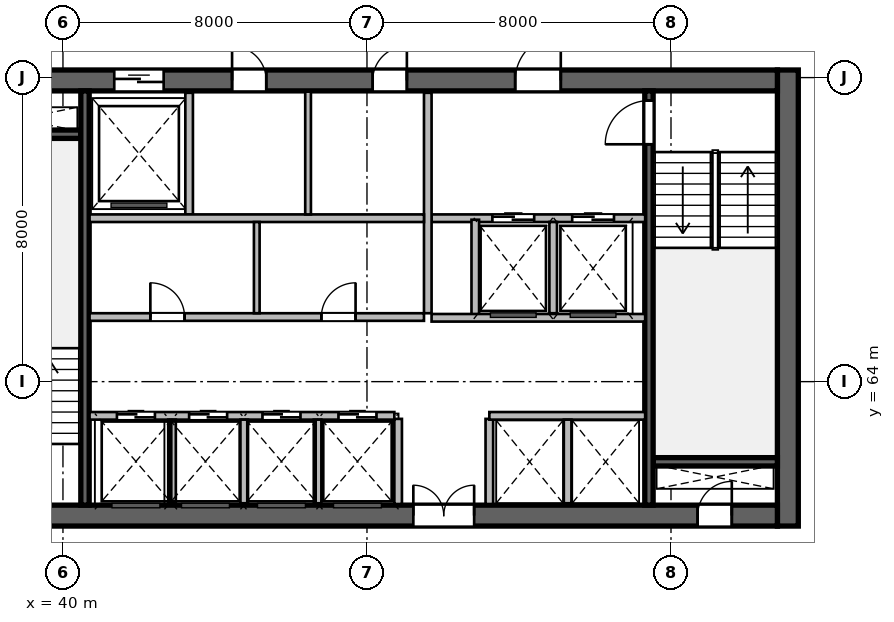
"""IFC4 building model, lengths in metres.
Left out: names, types, materials, properties, quantities, classifications, styles, units other than length and angle.
Written with IfcOpenShell. Run it as: python <this file> out.ifc"""

import sys

from ifc_helpers import new_model, si_unit, direction, frame, frame_2d, origin, place, context, subcontext, project, spatial, rectangle, extrude, source, transform, mapped, element, fill, save


model = new_model("IFC4")
c1 = context("Model", 3, precision=1e-05, world=origin(), true_north=direction((0.0, 1.0)))
c2 = subcontext(c1, "Body", "Model", "MODEL_VIEW")
j1 = project(units=[si_unit("LENGTHUNIT", "METRE"), si_unit("PLANEANGLEUNIT", "RADIAN")], contexts=[c1])
p1 = place(None, origin())
s1 = spatial("IfcSite", under=j1, at=p1, CompositionType="ELEMENT")
p2 = place(p1, origin())
s2 = spatial("IfcBuilding", under=s1, at=p2, CompositionType="ELEMENT")
p3 = place(p2, frame((0.0, 0.0, 75.0)))
s3 = spatial("IfcBuildingStorey", under=s2, at=p3, CompositionType="ELEMENT", Elevation=75.0)
m1 = source(origin(), c2, "Body", "SweptSolid", [
    extrude(rectangle(XDim=12.0, YDim=0.55, at=frame_2d((6.0, 0.0))), origin(), (0.0, 0.0, 1.0), 3.6),
])
p4 = place(p3, frame((59.075, 60.2, 0.0), z_axis=(0.0, 0.0, 1.0), x_axis=(0.0, 1.0, 0.0)))
e1 = element("IfcWall", 1, at=p4, inside=s3, PredefinedType="SHEAR", context=c2, shape_type="MappedRepresentation", body=[
    mapped(m1, transform((0.0, 0.0, 0.0), scale=1.0)),
])
m2 = source(origin(), c2, "Body", "SweptSolid", [
    extrude(rectangle(XDim=21.6, YDim=0.55, at=frame_2d((10.8, 0.0))), origin(), (0.0, 0.0, 1.0), 3.6),
])
p5 = place(p3, frame((37.2, 60.475, 0.0), z_axis=(0.0, 0.0, 1.0), x_axis=(1.0, 0.0, 0.0)))
e2 = element("IfcWall", 2, at=p5, inside=s3, PredefinedType="SHEAR", context=c2, shape_type="MappedRepresentation", body=[
    mapped(m2, transform((0.0, 0.0, 0.0), scale=1.0)),
])
p6 = place(p5, frame((1.1, 0.0, 0.0)))
e3 = element("IfcOpeningElement", 3, at=p6, cuts=e2, PredefinedType="OPENING", context=c2, shape_type="SweptSolid", body=[
    extrude(rectangle(XDim=1.15, YDim=2.15, at=frame_2d((0.575, 1.075))), frame((0.0, 0.285, 0.0), z_axis=(0.0, -1.0, 0.0), x_axis=(1.0, 0.0, 0.0)), (0.0, 0.0, 1.0), 0.57),
])
p7 = place(p5, frame((19.5, 0.0, 0.0)))
e4 = element("IfcOpeningElement", 4, at=p7, cuts=e2, PredefinedType="OPENING", context=c2, shape_type="SweptSolid", body=[
    extrude(rectangle(XDim=0.9, YDim=2.1, at=frame_2d((0.45, 1.05))), frame((0.0, 0.285, 0.0), z_axis=(0.0, -1.0, 0.0), x_axis=(1.0, 0.0, 0.0)), (0.0, 0.0, 1.0), 0.57),
])
p8 = place(p5, frame((12.02, 0.0, 0.0)))
e5 = element("IfcOpeningElement", 5, at=p8, cuts=e2, PredefinedType="OPENING", context=c2, shape_type="SweptSolid", body=[
    extrude(rectangle(XDim=1.6, YDim=2.15, at=frame_2d((0.8, 1.075))), frame((0.0, 0.285, 0.0), z_axis=(0.0, -1.0, 0.0), x_axis=(1.0, 0.0, 0.0)), (0.0, 0.0, 1.0), 0.57),
])
p9 = place(p3, frame((37.2, 71.925, 0.0), z_axis=(0.0, 0.0, 1.0), x_axis=(1.0, 0.0, 0.0)))
e6 = element("IfcWall", 6, at=p9, inside=s3, PredefinedType="SHEAR", context=c2, shape_type="MappedRepresentation", body=[
    mapped(m2, transform((0.0, 0.0, 0.0), scale=1.0)),
])
p10 = place(p9, frame((1.2, 0.0, 0.0)))
e7 = element("IfcOpeningElement", 7, at=p10, cuts=e6, PredefinedType="OPENING", context=c2, shape_type="SweptSolid", body=[
    extrude(rectangle(XDim=0.9, YDim=2.1, at=frame_2d((0.45, 1.05))), frame((0.0, 0.285, 0.0), z_axis=(0.0, -1.0, 0.0), x_axis=(1.0, 0.0, 0.0)), (0.0, 0.0, 1.0), 0.57),
])
p11 = place(p9, frame((14.7, 0.0, 0.0)))
e8 = element("IfcOpeningElement", 8, at=p11, cuts=e6, PredefinedType="OPENING", context=c2, shape_type="SweptSolid", body=[
    extrude(rectangle(XDim=1.2, YDim=2.15, at=frame_2d((0.6, 1.075))), frame((0.0, 0.285, 0.0), z_axis=(0.0, -1.0, 0.0), x_axis=(1.0, 0.0, 0.0)), (0.0, 0.0, 1.0), 0.57),
])
p12 = place(p9, frame((4.15, 0.0, 0.0)))
e9 = element("IfcOpeningElement", 9, at=p12, cuts=e6, PredefinedType="OPENING", context=c2, shape_type="SweptSolid", body=[
    extrude(rectangle(XDim=1.3, YDim=2.15, at=frame_2d((0.65, 1.075))), frame((0.0, 0.285, 0.0), z_axis=(0.0, -1.0, 0.0), x_axis=(1.0, 0.0, 0.0)), (0.0, 0.0, 1.0), 0.57),
])
p13 = place(p9, frame((7.25, 0.0, 0.0)))
e10 = element("IfcOpeningElement", 10, at=p13, cuts=e6, PredefinedType="OPENING", context=c2, shape_type="SweptSolid", body=[
    extrude(rectangle(XDim=0.9, YDim=2.1, at=frame_2d((0.45, 1.05))), frame((0.0, 0.285, 0.0), z_axis=(0.0, -1.0, 0.0), x_axis=(1.0, 0.0, 0.0)), (0.0, 0.0, 1.0), 0.57),
])
p14 = place(p9, frame((10.95, 0.0, 0.0)))
e11 = element("IfcOpeningElement", 11, at=p14, cuts=e6, PredefinedType="OPENING", context=c2, shape_type="SweptSolid", body=[
    extrude(rectangle(XDim=0.9, YDim=2.1, at=frame_2d((0.45, 1.05))), frame((0.0, 0.285, 0.0), z_axis=(0.0, -1.0, 0.0), x_axis=(1.0, 0.0, 0.0)), (0.0, 0.0, 1.0), 0.57),
])
m3 = source(origin(), c2, "Body", "SweptSolid", [
    extrude(rectangle(XDim=3.27, YDim=0.22, at=frame_2d((1.635, 0.0))), origin(), (0.0, 0.0, 1.0), 3.6),
])
for number, where, z_axis, x_axis in (
    (12, (37.2, 70.51, 0.0), (0.0, 0.0, 1.0), (1.0, 0.0, 0.0)),
    (13, (55.53, 61.89, 0.0), (0.0, 0.0, 1.0), (1.0, 0.0, 0.0)),
):
    element("IfcWall", number, at=place(p3, frame(where, z_axis=z_axis, x_axis=x_axis)), inside=s3, PredefinedType="SHEAR", context=c2, shape_type="MappedRepresentation", body=[
        mapped(m3, transform((0.0, 0.0, 0.0), scale=1.0)),
    ])
m4 = source(origin(), c2, "Body", "SweptSolid", [
    extrude(rectangle(XDim=10.9, YDim=0.22, at=frame_2d((5.45, 0.0))), origin(), (0.0, 0.0, 1.0), 3.6),
])
p15 = place(p3, frame((40.58, 60.75, 0.0), z_axis=(0.0, 0.0, 1.0), x_axis=(0.0, 1.0, 0.0)))
e14 = element("IfcWall", 14, at=p15, inside=s3, PredefinedType="SHEAR", context=c2, shape_type="MappedRepresentation", body=[
    mapped(m4, transform((0.0, 0.0, 0.0), scale=1.0)),
])
p16 = place(p3, frame((55.42, 60.75, 0.0), z_axis=(0.0, 0.0, 1.0), x_axis=(0.0, 1.0, 0.0)))
e15 = element("IfcWall", 15, at=p16, inside=s3, PredefinedType="SHEAR", context=c2, shape_type="MappedRepresentation", body=[
    mapped(m4, transform((0.0, 0.0, 0.0), scale=1.0)),
])
p17 = place(p16, frame((9.495, 0.0, 0.0)))
e16 = element("IfcOpeningElement", 16, at=p17, cuts=e15, PredefinedType="OPENING", context=c2, shape_type="SweptSolid", body=[
    extrude(rectangle(XDim=1.15, YDim=2.15, at=frame_2d((0.575, 1.075))), frame((0.0, 0.12, 0.0), z_axis=(0.0, -1.0, 0.0), x_axis=(1.0, 0.0, 0.0)), (0.0, 0.0, 1.0), 0.24),
])
m5 = source(origin(), c2, "Body", "SweptSolid", [
    extrude(rectangle(XDim=2.24, YDim=0.2, at=frame_2d((1.12, 0.0))), origin(), (0.0, 0.0, 1.0), 3.36),
])
for number, where, z_axis, x_axis in (
    (17, (48.82, 60.78, 0.0), (0.0, 0.0, 1.0), (0.0, 1.0, 0.0)),
    (18, (51.22, 60.78, 0.0), (0.0, 0.0, 1.0), (0.0, 1.0, 0.0)),
):
    element("IfcWall", number, at=place(p3, frame(where, z_axis=z_axis, x_axis=x_axis)), inside=s3, PredefinedType="SOLIDWALL", context=c2, shape_type="MappedRepresentation", body=[
        mapped(m5, transform((0.0, 0.0, 0.0), scale=1.0)),
    ])
m6 = source(origin(), c2, "Body", "SweptSolid", [
    extrude(rectangle(XDim=5.62, YDim=0.2, at=frame_2d((2.81, 0.0))), origin(), (0.0, 0.0, 1.0), 3.36),
])
p18 = place(p3, frame((49.7, 68.3, 0.0), z_axis=(0.0, 0.0, 1.0), x_axis=(1.0, 0.0, 0.0)))
e19 = element("IfcWall", 19, at=p18, inside=s3, PredefinedType="SOLIDWALL", context=c2, shape_type="MappedRepresentation", body=[
    mapped(m6, transform((0.0, 0.0, 0.0), scale=1.0)),
])
p19 = place(p18, frame((1.6, 0.0, 0.0)))
e20 = element("IfcOpeningElement", 20, at=p19, cuts=e19, PredefinedType="OPENING", context=c2, shape_type="SweptSolid", body=[
    extrude(rectangle(XDim=1.1, YDim=2.15, at=frame_2d((0.55, 1.075))), frame((0.0, 0.11, 0.0), z_axis=(0.0, -1.0, 0.0), x_axis=(1.0, 0.0, 0.0)), (0.0, 0.0, 1.0), 0.22),
])
p20 = place(p18, frame((3.7, 0.0, 0.0)))
e21 = element("IfcOpeningElement", 21, at=p20, cuts=e19, PredefinedType="OPENING", context=c2, shape_type="SweptSolid", body=[
    extrude(rectangle(XDim=1.1, YDim=2.15, at=frame_2d((0.55, 1.075))), frame((0.0, 0.11, 0.0), z_axis=(0.0, -1.0, 0.0), x_axis=(1.0, 0.0, 0.0)), (0.0, 0.0, 1.0), 0.22),
])
m7 = source(origin(), c2, "Body", "SweptSolid", [
    extrude(rectangle(XDim=5.8, YDim=0.2, at=frame_2d((2.9, 0.0))), origin(), (0.0, 0.0, 1.0), 3.36),
])
p21 = place(p3, frame((49.6, 65.8, 0.0), z_axis=(0.0, 0.0, 1.0), x_axis=(0.0, 1.0, 0.0)))
e22 = element("IfcWall", 22, at=p21, inside=s3, PredefinedType="SOLIDWALL", context=c2, shape_type="MappedRepresentation", body=[
    mapped(m7, transform((0.0, 0.0, 0.0), scale=1.0)),
])
m8 = source(origin(), c2, "Body", "SweptSolid", [
    extrude(rectangle(XDim=2.58, YDim=0.2, at=frame_2d((1.29, 0.0))), origin(), (0.0, 0.0, 1.0), 3.36),
])
p22 = place(p3, frame((50.85, 65.68, 0.0), z_axis=(0.0, 0.0, 1.0), x_axis=(0.0, 1.0, 0.0)))
e23 = element("IfcWall", 23, at=p22, inside=s3, PredefinedType="SOLIDWALL", context=c2, shape_type="MappedRepresentation", body=[
    mapped(m8, transform((0.0, 0.0, 0.0), scale=1.0)),
])
m9 = source(origin(), c2, "Body", "SweptSolid", [
    extrude(rectangle(XDim=2.4, YDim=0.2, at=frame_2d((1.2, 0.0))), origin(), (0.0, 0.0, 1.0), 3.36),
])
p23 = place(p3, frame((52.9, 65.8, 0.0), z_axis=(0.0, 0.0, 1.0), x_axis=(0.0, 1.0, 0.0)))
e24 = element("IfcWall", 24, at=p23, inside=s3, PredefinedType="SOLIDWALL", context=c2, shape_type="MappedRepresentation", body=[
    mapped(m9, transform((0.0, 0.0, 0.0), scale=1.0)),
])
p24 = place(p3, frame((49.7, 65.68, 0.0), z_axis=(0.0, 0.0, 1.0), x_axis=(1.0, 0.0, 0.0)))
e25 = element("IfcWall", 25, at=p24, inside=s3, PredefinedType="SOLIDWALL", context=c2, shape_type="MappedRepresentation", body=[
    mapped(m6, transform((0.0, 0.0, 0.0), scale=1.0)),
])
m10 = source(origin(), c2, "Body", "SweptSolid", [
    extrude(rectangle(XDim=3.2, YDim=0.2, at=frame_2d((1.6, 0.0))), origin(), (0.0, 0.0, 1.0), 3.36),
])
p25 = place(p3, frame((43.32, 68.4, 0.0), z_axis=(0.0, 0.0, 1.0), x_axis=(0.0, 1.0, 0.0)))
e26 = element("IfcWall", 26, at=p25, inside=s3, PredefinedType="SOLIDWALL", context=c2, shape_type="MappedRepresentation", body=[
    mapped(m10, transform((0.0, 0.0, 0.0), scale=1.0)),
])
m11 = source(origin(), c2, "Body", "SweptSolid", [
    extrude(rectangle(XDim=8.8, YDim=0.2, at=frame_2d((4.4, 0.0))), origin(), (0.0, 0.0, 1.0), 3.36),
])
p26 = place(p3, frame((40.7, 68.3, 0.0), z_axis=(0.0, 0.0, 1.0), x_axis=(1.0, 0.0, 0.0)))
e27 = element("IfcWall", 27, at=p26, inside=s3, PredefinedType="SOLIDWALL", context=c2, shape_type="MappedRepresentation", body=[
    mapped(m11, transform((0.0, 0.0, 0.0), scale=1.0)),
])
m12 = source(origin(), c2, "Body", "SweptSolid", [
    extrude(rectangle(XDim=3.23, YDim=0.15, at=frame_2d((1.615, 0.0))), origin(), (0.0, 0.0, 1.0), 3.36),
])
p27 = place(p3, frame((46.45, 68.4, 0.0), z_axis=(0.0, 0.0, 1.0), x_axis=(0.0, 1.0, 0.0)))
e28 = element("IfcWall", 28, at=p27, inside=s3, PredefinedType="PARTITIONING", context=c2, shape_type="MappedRepresentation", body=[
    mapped(m12, transform((0.0, 0.0, 0.0), scale=1.0)),
])
m13 = source(origin(), c2, "Body", "SweptSolid", [
    extrude(rectangle(XDim=8.02, YDim=0.2, at=frame_2d((4.01, 0.0))), origin(), (0.0, 0.0, 1.0), 3.36),
])
p28 = place(p3, frame((40.7, 63.1, 0.0), z_axis=(0.0, 0.0, 1.0), x_axis=(1.0, 0.0, 0.0)))
e29 = element("IfcWall", 29, at=p28, inside=s3, PredefinedType="SOLIDWALL", context=c2, shape_type="MappedRepresentation", body=[
    mapped(m13, transform((0.0, 0.0, 0.0), scale=1.0)),
])
p29 = place(p28, frame((0.72, 0.0, 0.0)))
e30 = element("IfcOpeningElement", 30, at=p29, cuts=e29, PredefinedType="OPENING", context=c2, shape_type="SweptSolid", body=[
    extrude(rectangle(XDim=1.0, YDim=2.15, at=frame_2d((0.5, 1.075))), frame((0.0, 0.11, 0.0), z_axis=(0.0, -1.0, 0.0), x_axis=(1.0, 0.0, 0.0)), (0.0, 0.0, 1.0), 0.22),
])
p30 = place(p28, frame((2.62, 0.0, 0.0)))
e31 = element("IfcOpeningElement", 31, at=p30, cuts=e29, PredefinedType="OPENING", context=c2, shape_type="SweptSolid", body=[
    extrude(rectangle(XDim=1.0, YDim=2.15, at=frame_2d((0.5, 1.075))), frame((0.0, 0.11, 0.0), z_axis=(0.0, -1.0, 0.0), x_axis=(1.0, 0.0, 0.0)), (0.0, 0.0, 1.0), 0.22),
])
p31 = place(p28, frame((4.55, 0.0, 0.0)))
e32 = element("IfcOpeningElement", 32, at=p31, cuts=e29, PredefinedType="OPENING", context=c2, shape_type="SweptSolid", body=[
    extrude(rectangle(XDim=1.0, YDim=2.15, at=frame_2d((0.5, 1.075))), frame((0.0, 0.11, 0.0), z_axis=(0.0, -1.0, 0.0), x_axis=(1.0, 0.0, 0.0)), (0.0, 0.0, 1.0), 0.22),
])
p32 = place(p28, frame((6.55, 0.0, 0.0)))
e33 = element("IfcOpeningElement", 33, at=p32, cuts=e29, PredefinedType="OPENING", context=c2, shape_type="SweptSolid", body=[
    extrude(rectangle(XDim=1.0, YDim=2.15, at=frame_2d((0.5, 1.075))), frame((0.0, 0.11, 0.0), z_axis=(0.0, -1.0, 0.0), x_axis=(1.0, 0.0, 0.0)), (0.0, 0.0, 1.0), 0.22),
])
m14 = source(origin(), c2, "Body", "SweptSolid", [
    extrude(rectangle(XDim=4.1, YDim=0.2, at=frame_2d((2.05, 0.0))), origin(), (0.0, 0.0, 1.0), 3.36),
])
p33 = place(p3, frame((51.22, 63.1, 0.0), z_axis=(0.0, 0.0, 1.0), x_axis=(1.0, 0.0, 0.0)))
e34 = element("IfcWall", 34, at=p33, inside=s3, PredefinedType="SOLIDWALL", context=c2, shape_type="MappedRepresentation", body=[
    mapped(m14, transform((0.0, 0.0, 0.0), scale=1.0)),
])
m15 = source(origin(), c2, "Body", "SweptSolid", [
    extrude(rectangle(XDim=2.2, YDim=0.2, at=frame_2d((1.1, 0.0))), origin(), (0.0, 0.0, 1.0), 3.36),
])
for number, where, z_axis, x_axis in (
    (35, (42.87, 60.8, 0.0), (0.0, 0.0, 1.0), (0.0, 1.0, 0.0)),
    (36, (44.77, 60.8, 0.0), (0.0, 0.0, 1.0), (0.0, 1.0, 0.0)),
    (37, (46.7, 60.8, 0.0), (0.0, 0.0, 1.0), (0.0, 1.0, 0.0)),
    (38, (53.28, 60.8, 0.0), (0.0, 0.0, 1.0), (0.0, 1.0, 0.0)),
):
    element("IfcWall", number, at=place(p3, frame(where, z_axis=z_axis, x_axis=x_axis)), inside=s3, PredefinedType="SOLIDWALL", context=c2, shape_type="MappedRepresentation", body=[
        mapped(m15, transform((0.0, 0.0, 0.0), scale=1.0)),
    ])
p34 = place(p3, frame((40.7, 65.7, 0.0), z_axis=(0.0, 0.0, 1.0), x_axis=(1.0, 0.0, 0.0)))
e39 = element("IfcWall", 39, at=p34, inside=s3, PredefinedType="SOLIDWALL", context=c2, shape_type="MappedRepresentation", body=[
    mapped(m11, transform((0.0, 0.0, 0.0), scale=1.0)),
])
p35 = place(p34, frame((1.6, 0.0, 0.0)))
e40 = element("IfcOpeningElement", 40, at=p35, cuts=e39, PredefinedType="OPENING", context=c2, shape_type="SweptSolid", body=[
    extrude(rectangle(XDim=0.9, YDim=2.1, at=frame_2d((0.45, 1.05))), frame((0.0, 0.11, 0.0), z_axis=(0.0, -1.0, 0.0), x_axis=(1.0, 0.0, 0.0)), (0.0, 0.0, 1.0), 0.22),
])
p36 = place(p34, frame((6.1, 0.0, 0.0)))
e41 = element("IfcOpeningElement", 41, at=p36, cuts=e39, PredefinedType="OPENING", context=c2, shape_type="SweptSolid", body=[
    extrude(rectangle(XDim=0.9, YDim=2.1, at=frame_2d((0.45, 1.05))), frame((0.0, 0.11, 0.0), z_axis=(0.0, -1.0, 0.0), x_axis=(1.0, 0.0, 0.0)), (0.0, 0.0, 1.0), 0.22),
])
m16 = source(origin(), c2, "Body", "SweptSolid", [
    extrude(rectangle(XDim=2.4, YDim=0.15, at=frame_2d((1.2, 0.0))), origin(), (0.0, 0.0, 1.0), 3.36),
])
p37 = place(p3, frame((45.1, 65.8, 0.0), z_axis=(0.0, 0.0, 1.0), x_axis=(0.0, 1.0, 0.0)))
e42 = element("IfcWall", 42, at=p37, inside=s3, PredefinedType="PARTITIONING", context=c2, shape_type="MappedRepresentation", body=[
    mapped(m16, transform((0.0, 0.0, 0.0), scale=1.0)),
])
m17 = source(origin(), c2, "Body", "SweptSolid", [
    extrude(rectangle(XDim=12.196, YDim=0.21, at=frame_2d((6.098, 0.0))), origin(), (0.0, 0.0, 1.0), 3.36),
])
p38 = place(p3, frame((57.742, 48.766, 0.0), z_axis=(0.0, 0.0, 1.0), x_axis=(0.342022711534, 0.939691686031, 0.0)))
e43 = element("IfcWall", 43, at=p38, inside=s3, PredefinedType="PARTITIONING", context=c2, shape_type="MappedRepresentation", body=[
    mapped(m17, transform((0.0, 0.0, 0.0), scale=1.0)),
])
m18 = source(origin(), c2, "Body", "SweptSolid", [
    extrude(rectangle(XDim=0.9, YDim=2.1, at=frame_2d((0.45, 1.05))), frame((0.0, 0.025, 0.0), z_axis=(0.0, -1.0, 0.0), x_axis=(1.0, 0.0, 0.0)), (0.0, 0.0, 1.0), 0.05),
])
p39 = place(p7, origin())
e44 = element("IfcDoor", 44, at=p39, inside=s3, OperationType="SINGLE_SWING_RIGHT", PredefinedType="DOOR", context=c2, shape_type="MappedRepresentation", body=[
    mapped(m18, transform((0.0, 0.0, 0.0), scale=1.0)),
])
fill(e4, e44)
m19 = source(origin(), c2, "Body", "SweptSolid", [
    extrude(rectangle(XDim=1.15, YDim=2.15, at=frame_2d((0.575, 1.075))), frame((0.0, 0.025, 0.0), z_axis=(0.0, -1.0, 0.0), x_axis=(1.0, 0.0, 0.0)), (0.0, 0.0, 1.0), 0.05),
])
p40 = place(p17, origin())
e45 = element("IfcDoor", 45, at=p40, inside=s3, OperationType="SINGLE_SWING_LEFT", PredefinedType="DOOR", context=c2, shape_type="MappedRepresentation", body=[
    mapped(m19, transform((0.0, 0.0, 0.0), scale=1.0)),
])
fill(e16, e45)
m20 = source(origin(), c2, "Body", "SweptSolid", [
    extrude(rectangle(XDim=1.6, YDim=2.15, at=frame_2d((0.8, 1.075))), frame((0.0, 0.025, 0.0), z_axis=(0.0, -1.0, 0.0), x_axis=(1.0, 0.0, 0.0)), (0.0, 0.0, 1.0), 0.05),
])
p41 = place(p8, origin())
e46 = element("IfcDoor", 46, at=p41, inside=s3, OperationType="DOUBLE_DOOR_SINGLE_SWING", PredefinedType="DOOR", context=c2, shape_type="MappedRepresentation", body=[
    mapped(m20, transform((0.0, 0.0, 0.0), scale=1.0)),
])
fill(e5, e46)
m21 = source(origin(), c2, "Body", "SweptSolid", [
    extrude(rectangle(XDim=1.2, YDim=2.15, at=frame_2d((0.6, 1.075))), frame((0.0, 0.025, 0.0), z_axis=(0.0, -1.0, 0.0), x_axis=(1.0, 0.0, 0.0)), (0.0, 0.0, 1.0), 0.05),
])
p42 = place(p11, origin())
e47 = element("IfcDoor", 47, at=p42, inside=s3, OperationType="SINGLE_SWING_RIGHT", PredefinedType="DOOR", context=c2, shape_type="MappedRepresentation", body=[
    mapped(m21, transform((0.0, 0.0, 0.0), scale=1.0)),
])
fill(e8, e47)
m22 = source(origin(), c2, "Body", "SweptSolid", [
    extrude(rectangle(XDim=1.1, YDim=2.15, at=frame_2d((0.55, 1.075))), frame((0.0, 0.025, 0.0), z_axis=(0.0, -1.0, 0.0), x_axis=(1.0, 0.0, 0.0)), (0.0, 0.0, 1.0), 0.05),
])
p43 = place(p19, origin())
e48 = element("IfcDoor", 48, at=p43, inside=s3, OperationType="DOUBLE_DOOR_SLIDING", PredefinedType="DOOR", context=c2, shape_type="MappedRepresentation", body=[
    mapped(m22, transform((0.0, 0.0, 0.0), scale=1.0)),
])
fill(e20, e48)
p44 = place(p20, origin())
e49 = element("IfcDoor", 49, at=p44, inside=s3, OperationType="DOUBLE_DOOR_SLIDING", PredefinedType="DOOR", context=c2, shape_type="MappedRepresentation", body=[
    mapped(m22, transform((0.0, 0.0, 0.0), scale=1.0)),
])
fill(e21, e49)
m23 = source(origin(), c2, "Body", "SweptSolid", [
    extrude(rectangle(XDim=1.3, YDim=2.15, at=frame_2d((0.65, 1.075))), frame((0.0, 0.025, 0.0), z_axis=(0.0, -1.0, 0.0), x_axis=(1.0, 0.0, 0.0)), (0.0, 0.0, 1.0), 0.05),
])
p45 = place(p12, origin())
e50 = element("IfcDoor", 50, at=p45, inside=s3, OperationType="DOUBLE_DOOR_SLIDING", PredefinedType="DOOR", context=c2, shape_type="MappedRepresentation", body=[
    mapped(m23, transform((0.0, 0.0, 0.0), scale=1.0)),
])
fill(e9, e50)
p46 = place(p13, origin())
e51 = element("IfcDoor", 51, at=p46, inside=s3, OperationType="SINGLE_SWING_LEFT", PredefinedType="DOOR", context=c2, shape_type="MappedRepresentation", body=[
    mapped(m18, transform((0.0, 0.0, 0.0), scale=1.0)),
])
fill(e10, e51)
p47 = place(p14, origin())
e52 = element("IfcDoor", 52, at=p47, inside=s3, OperationType="SINGLE_SWING_RIGHT", PredefinedType="DOOR", context=c2, shape_type="MappedRepresentation", body=[
    mapped(m18, transform((0.0, 0.0, 0.0), scale=1.0)),
])
fill(e11, e52)
m24 = source(origin(), c2, "Body", "SweptSolid", [
    extrude(rectangle(XDim=1.0, YDim=2.15, at=frame_2d((0.5, 1.075))), frame((0.0, 0.025, 0.0), z_axis=(0.0, -1.0, 0.0), x_axis=(1.0, 0.0, 0.0)), (0.0, 0.0, 1.0), 0.05),
])
p48 = place(p29, origin())
e53 = element("IfcDoor", 53, at=p48, inside=s3, OperationType="DOUBLE_DOOR_SLIDING", PredefinedType="DOOR", context=c2, shape_type="MappedRepresentation", body=[
    mapped(m24, transform((0.0, 0.0, 0.0), scale=1.0)),
])
fill(e30, e53)
p49 = place(p30, origin())
e54 = element("IfcDoor", 54, at=p49, inside=s3, OperationType="DOUBLE_DOOR_SLIDING", PredefinedType="DOOR", context=c2, shape_type="MappedRepresentation", body=[
    mapped(m24, transform((0.0, 0.0, 0.0), scale=1.0)),
])
fill(e31, e54)
p50 = place(p31, origin())
e55 = element("IfcDoor", 55, at=p50, inside=s3, OperationType="DOUBLE_DOOR_SLIDING", PredefinedType="DOOR", context=c2, shape_type="MappedRepresentation", body=[
    mapped(m24, transform((0.0, 0.0, 0.0), scale=1.0)),
])
fill(e32, e55)
p51 = place(p32, origin())
e56 = element("IfcDoor", 56, at=p51, inside=s3, OperationType="DOUBLE_DOOR_SLIDING", PredefinedType="DOOR", context=c2, shape_type="MappedRepresentation", body=[
    mapped(m24, transform((0.0, 0.0, 0.0), scale=1.0)),
])
fill(e33, e56)
p52 = place(p35, origin())
e57 = element("IfcDoor", 57, at=p52, inside=s3, OperationType="SINGLE_SWING_LEFT", PredefinedType="DOOR", context=c2, shape_type="MappedRepresentation", body=[
    mapped(m18, transform((0.0, 0.0, 0.0), scale=1.0)),
])
fill(e40, e57)
p53 = place(p36, origin())
e58 = element("IfcDoor", 58, at=p53, inside=s3, OperationType="SINGLE_SWING_RIGHT", PredefinedType="DOOR", context=c2, shape_type="MappedRepresentation", body=[
    mapped(m18, transform((0.0, 0.0, 0.0), scale=1.0)),
])
fill(e41, e58)
save(model, sys.argv[1])
